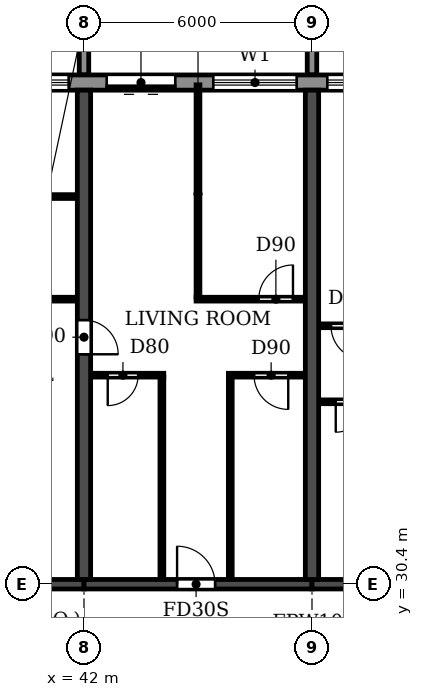
"""IFC4 building model, lengths in metres.
Left out: names, types, materials, properties, quantities, classifications, styles, units other than length and angle.
Written with IfcOpenShell. Run it as: python <this file> out.ifc"""

import sys

from ifc_helpers import new_model, si_unit, direction, frame, frame_2d, origin, place, context, subcontext, project, spatial, polyline, rectangle, outline, extrude, source, transform, mapped, element, fill, save


model = new_model("IFC4")
c1 = context("Model", 3, precision=1e-05, world=origin(), true_north=direction((0.0, 1.0)))
c2 = subcontext(c1, "Body", "Model", "MODEL_VIEW")
j1 = project(units=[si_unit("LENGTHUNIT", "METRE"), si_unit("PLANEANGLEUNIT", "RADIAN")], contexts=[c1])
p1 = place(None, origin())
s1 = spatial("IfcSite", under=j1, at=p1, CompositionType="ELEMENT")
p2 = place(p1, origin())
s2 = spatial("IfcBuilding", under=s1, at=p2, CompositionType="ELEMENT")
p3 = place(p2, frame((0.0, 0.0, 76.2)))
s3 = spatial("IfcBuildingStorey", under=s2, at=p3, CompositionType="ELEMENT", Elevation=76.2)
p4 = place(p3, frame((42.0, 30.525, 0.0), z_axis=(0.0, 0.0, 1.0), x_axis=(0.0, 1.0, 0.0)))
e1 = element("IfcWall", 1, at=p4, inside=s3, PredefinedType="SHEAR", context=c2, shape_type="SweptSolid", body=[
    extrude(rectangle(XDim=12.875, YDim=0.35, at=frame_2d((6.438, 0.0))), origin(), (0.0, 0.0, 1.0), 3.06),
])
p5 = place(p4, frame((5.925, 0.0, 0.0)))
e2 = element("IfcOpeningElement", 2, at=p5, cuts=e1, PredefinedType="OPENING", context=c2, shape_type="SweptSolid", body=[
    extrude(rectangle(XDim=0.9, YDim=2.1, at=frame_2d((0.45, 1.05))), frame((0.0, 0.185, 0.0), z_axis=(0.0, -1.0, 0.0), x_axis=(1.0, 0.0, 0.0)), (0.0, 0.0, 1.0), 0.37),
])
p6 = place(p3, frame((48.0, 30.525, 0.0), z_axis=(0.0, 0.0, 1.0), x_axis=(0.0, 1.0, 0.0)))
e3 = element("IfcWall", 3, at=p6, inside=s3, PredefinedType="SHEAR", context=c2, shape_type="SweptSolid", body=[
    extrude(rectangle(XDim=12.875, YDim=0.35, at=frame_2d((6.438, 0.0))), origin(), (0.0, 0.0, 1.0), 3.06),
])
p7 = place(p3, frame((36.0, 30.4, 0.0), z_axis=(0.0, 0.0, 1.0), x_axis=(1.0, 0.0, 0.0)))
e4 = element("IfcWall", 4, at=p7, inside=s3, PredefinedType="SHEAR", context=c2, shape_type="SweptSolid", body=[
    extrude(rectangle(XDim=6.0, YDim=0.25, at=frame_2d((3.0, 0.0))), origin(), (0.0, 0.0, 1.0), 2.46),
])
p8 = place(p3, frame((42.0, 30.4, 0.0), z_axis=(0.0, 0.0, 1.0), x_axis=(1.0, 0.0, 0.0)))
e5 = element("IfcWall", 5, at=p8, inside=s3, PredefinedType="SHEAR", context=c2, shape_type="SweptSolid", body=[
    extrude(rectangle(XDim=6.0, YDim=0.25, at=frame_2d((3.0, 0.0))), origin(), (0.0, 0.0, 1.0), 2.46),
])
p9 = place(p8, frame((2.45, 0.0, 0.0)))
e6 = element("IfcOpeningElement", 6, at=p9, cuts=e5, PredefinedType="OPENING", context=c2, shape_type="SweptSolid", body=[
    extrude(rectangle(XDim=1.0, YDim=2.1, at=frame_2d((0.5, 1.05))), frame((0.0, 0.135, 0.0), z_axis=(0.0, -1.0, 0.0), x_axis=(1.0, 0.0, 0.0)), (0.0, 0.0, 1.0), 0.27),
])
p10 = place(p3, frame((48.0, 30.4, 0.0), z_axis=(0.0, 0.0, 1.0), x_axis=(1.0, 0.0, 0.0)))
e7 = element("IfcWall", 7, at=p10, inside=s3, PredefinedType="SHEAR", context=c2, shape_type="SweptSolid", body=[
    extrude(rectangle(XDim=6.0, YDim=0.25, at=frame_2d((3.0, 0.0))), origin(), (0.0, 0.0, 1.0), 2.46),
])
p11 = place(p10, frame((2.45, 0.0, 0.0)))
e8 = element("IfcOpeningElement", 8, at=p11, cuts=e7, PredefinedType="OPENING", context=c2, shape_type="SweptSolid", body=[
    extrude(rectangle(XDim=1.0, YDim=2.1, at=frame_2d((0.5, 1.05))), frame((0.0, 0.135, 0.0), z_axis=(0.0, -1.0, 0.0), x_axis=(1.0, 0.0, 0.0)), (0.0, 0.0, 1.0), 0.27),
])
p12 = place(p3, frame((91.317, 43.6, 0.0), z_axis=(0.0, 0.0, 1.0), x_axis=(-1.0, 0.0, 0.0)))
e9 = element("IfcWall", 9, at=p12, inside=s3, PredefinedType="STANDARD", context=c2, shape_type="SweptSolid", body=[
    extrude(rectangle(XDim=80.634, YDim=0.4, at=frame_2d((40.317, 0.0))), origin(), (0.0, 0.0, 1.0), 3.06),
])
p13 = place(p12, frame((76.717, 0.0, 0.9)))
e10 = element("IfcOpeningElement", 10, at=p13, cuts=e9, PredefinedType="OPENING", context=c2, shape_type="SweptSolid", body=[
    extrude(rectangle(XDim=2.2, YDim=1.5, at=frame_2d((1.1, 0.75))), frame((0.0, 0.21, 0.0), z_axis=(0.0, -1.0, 0.0), x_axis=(1.0, 0.0, 0.0)), (0.0, 0.0, 1.0), 0.42),
])
p14 = place(p12, frame((73.917, 0.0, 0.0)))
e11 = element("IfcOpeningElement", 11, at=p14, cuts=e9, PredefinedType="OPENING", context=c2, shape_type="SweptSolid", body=[
    extrude(rectangle(XDim=1.8, YDim=2.4, at=frame_2d((0.9, 1.2))), frame((0.0, 0.21, 0.0), z_axis=(0.0, -1.0, 0.0), x_axis=(1.0, 0.0, 0.0)), (0.0, 0.0, 1.0), 0.42),
])
p15 = place(p12, frame((70.917, 0.0, 0.0)))
e12 = element("IfcOpeningElement", 12, at=p15, cuts=e9, PredefinedType="OPENING", context=c2, shape_type="SweptSolid", body=[
    extrude(rectangle(XDim=1.8, YDim=2.4, at=frame_2d((0.9, 1.2))), frame((0.0, 0.21, 0.0), z_axis=(0.0, -1.0, 0.0), x_axis=(1.0, 0.0, 0.0)), (0.0, 0.0, 1.0), 0.42),
])
p16 = place(p12, frame((67.717, 0.0, 0.9)))
e13 = element("IfcOpeningElement", 13, at=p16, cuts=e9, PredefinedType="OPENING", context=c2, shape_type="SweptSolid", body=[
    extrude(rectangle(XDim=2.2, YDim=1.5, at=frame_2d((1.1, 0.75))), frame((0.0, 0.21, 0.0), z_axis=(0.0, -1.0, 0.0), x_axis=(1.0, 0.0, 0.0)), (0.0, 0.0, 1.0), 0.42),
])
p17 = place(p12, frame((64.717, 0.0, 0.9)))
e14 = element("IfcOpeningElement", 14, at=p17, cuts=e9, PredefinedType="OPENING", context=c2, shape_type="SweptSolid", body=[
    extrude(rectangle(XDim=2.2, YDim=1.5, at=frame_2d((1.1, 0.75))), frame((0.0, 0.21, 0.0), z_axis=(0.0, -1.0, 0.0), x_axis=(1.0, 0.0, 0.0)), (0.0, 0.0, 1.0), 0.42),
])
p18 = place(p12, frame((61.917, 0.0, 0.0)))
e15 = element("IfcOpeningElement", 15, at=p18, cuts=e9, PredefinedType="OPENING", context=c2, shape_type="SweptSolid", body=[
    extrude(rectangle(XDim=1.8, YDim=2.4, at=frame_2d((0.9, 1.2))), frame((0.0, 0.21, 0.0), z_axis=(0.0, -1.0, 0.0), x_axis=(1.0, 0.0, 0.0)), (0.0, 0.0, 1.0), 0.42),
])
p19 = place(p12, frame((58.717, 0.0, 0.9)))
e16 = element("IfcOpeningElement", 16, at=p19, cuts=e9, PredefinedType="OPENING", context=c2, shape_type="SweptSolid", body=[
    extrude(rectangle(XDim=2.2, YDim=1.5, at=frame_2d((1.1, 0.75))), frame((0.0, 0.21, 0.0), z_axis=(0.0, -1.0, 0.0), x_axis=(1.0, 0.0, 0.0)), (0.0, 0.0, 1.0), 0.42),
])
p20 = place(p12, frame((55.917, 0.0, 0.0)))
e17 = element("IfcOpeningElement", 17, at=p20, cuts=e9, PredefinedType="OPENING", context=c2, shape_type="SweptSolid", body=[
    extrude(rectangle(XDim=1.8, YDim=2.4, at=frame_2d((0.9, 1.2))), frame((0.0, 0.21, 0.0), z_axis=(0.0, -1.0, 0.0), x_axis=(1.0, 0.0, 0.0)), (0.0, 0.0, 1.0), 0.42),
])
p21 = place(p12, frame((52.717, 0.0, 0.9)))
e18 = element("IfcOpeningElement", 18, at=p21, cuts=e9, PredefinedType="OPENING", context=c2, shape_type="SweptSolid", body=[
    extrude(rectangle(XDim=2.2, YDim=1.5, at=frame_2d((1.1, 0.75))), frame((0.0, 0.21, 0.0), z_axis=(0.0, -1.0, 0.0), x_axis=(1.0, 0.0, 0.0)), (0.0, 0.0, 1.0), 0.42),
])
p22 = place(p12, frame((49.717, 0.0, 0.9)))
e19 = element("IfcOpeningElement", 19, at=p22, cuts=e9, PredefinedType="OPENING", context=c2, shape_type="SweptSolid", body=[
    extrude(rectangle(XDim=2.2, YDim=1.5, at=frame_2d((1.1, 0.75))), frame((0.0, 0.21, 0.0), z_axis=(0.0, -1.0, 0.0), x_axis=(1.0, 0.0, 0.0)), (0.0, 0.0, 1.0), 0.42),
])
p23 = place(p12, frame((46.917, 0.0, 0.0)))
e20 = element("IfcOpeningElement", 20, at=p23, cuts=e9, PredefinedType="OPENING", context=c2, shape_type="SweptSolid", body=[
    extrude(rectangle(XDim=1.8, YDim=2.4, at=frame_2d((0.9, 1.2))), frame((0.0, 0.21, 0.0), z_axis=(0.0, -1.0, 0.0), x_axis=(1.0, 0.0, 0.0)), (0.0, 0.0, 1.0), 0.42),
])
p24 = place(p12, frame((43.717, 0.0, 0.9)))
e21 = element("IfcOpeningElement", 21, at=p24, cuts=e9, PredefinedType="OPENING", context=c2, shape_type="SweptSolid", body=[
    extrude(rectangle(XDim=2.2, YDim=1.5, at=frame_2d((1.1, 0.75))), frame((0.0, 0.21, 0.0), z_axis=(0.0, -1.0, 0.0), x_axis=(1.0, 0.0, 0.0)), (0.0, 0.0, 1.0), 0.42),
])
p25 = place(p12, frame((40.717, 0.0, 0.9)))
e22 = element("IfcOpeningElement", 22, at=p25, cuts=e9, PredefinedType="OPENING", context=c2, shape_type="SweptSolid", body=[
    extrude(rectangle(XDim=2.2, YDim=1.5, at=frame_2d((1.1, 0.75))), frame((0.0, 0.21, 0.0), z_axis=(0.0, -1.0, 0.0), x_axis=(1.0, 0.0, 0.0)), (0.0, 0.0, 1.0), 0.42),
])
p26 = place(p12, frame((37.917, 0.0, 0.0)))
e23 = element("IfcOpeningElement", 23, at=p26, cuts=e9, PredefinedType="OPENING", context=c2, shape_type="SweptSolid", body=[
    extrude(rectangle(XDim=1.8, YDim=2.4, at=frame_2d((0.9, 1.2))), frame((0.0, 0.21, 0.0), z_axis=(0.0, -1.0, 0.0), x_axis=(1.0, 0.0, 0.0)), (0.0, 0.0, 1.0), 0.42),
])
p27 = place(p12, frame((34.717, 0.0, 0.9)))
e24 = element("IfcOpeningElement", 24, at=p27, cuts=e9, PredefinedType="OPENING", context=c2, shape_type="SweptSolid", body=[
    extrude(rectangle(XDim=2.2, YDim=1.5, at=frame_2d((1.1, 0.75))), frame((0.0, 0.21, 0.0), z_axis=(0.0, -1.0, 0.0), x_axis=(1.0, 0.0, 0.0)), (0.0, 0.0, 1.0), 0.42),
])
p28 = place(p12, frame((31.917, 0.0, 0.0)))
e25 = element("IfcOpeningElement", 25, at=p28, cuts=e9, PredefinedType="OPENING", context=c2, shape_type="SweptSolid", body=[
    extrude(rectangle(XDim=1.8, YDim=2.4, at=frame_2d((0.9, 1.2))), frame((0.0, 0.21, 0.0), z_axis=(0.0, -1.0, 0.0), x_axis=(1.0, 0.0, 0.0)), (0.0, 0.0, 1.0), 0.42),
])
p29 = place(p12, frame((28.717, 0.0, 0.9)))
e26 = element("IfcOpeningElement", 26, at=p29, cuts=e9, PredefinedType="OPENING", context=c2, shape_type="SweptSolid", body=[
    extrude(rectangle(XDim=2.2, YDim=1.5, at=frame_2d((1.1, 0.75))), frame((0.0, 0.21, 0.0), z_axis=(0.0, -1.0, 0.0), x_axis=(1.0, 0.0, 0.0)), (0.0, 0.0, 1.0), 0.42),
])
p30 = place(p12, frame((25.717, 0.0, 0.9)))
e27 = element("IfcOpeningElement", 27, at=p30, cuts=e9, PredefinedType="OPENING", context=c2, shape_type="SweptSolid", body=[
    extrude(rectangle(XDim=2.2, YDim=1.5, at=frame_2d((1.1, 0.75))), frame((0.0, 0.21, 0.0), z_axis=(0.0, -1.0, 0.0), x_axis=(1.0, 0.0, 0.0)), (0.0, 0.0, 1.0), 0.42),
])
p31 = place(p12, frame((22.717, 0.0, 0.9)))
e28 = element("IfcOpeningElement", 28, at=p31, cuts=e9, PredefinedType="OPENING", context=c2, shape_type="SweptSolid", body=[
    extrude(rectangle(XDim=2.2, YDim=1.5, at=frame_2d((1.1, 0.75))), frame((0.0, 0.21, 0.0), z_axis=(0.0, -1.0, 0.0), x_axis=(1.0, 0.0, 0.0)), (0.0, 0.0, 1.0), 0.42),
])
p32 = place(p12, frame((19.917, 0.0, 0.0)))
e29 = element("IfcOpeningElement", 29, at=p32, cuts=e9, PredefinedType="OPENING", context=c2, shape_type="SweptSolid", body=[
    extrude(rectangle(XDim=1.8, YDim=2.4, at=frame_2d((0.9, 1.2))), frame((0.0, 0.21, 0.0), z_axis=(0.0, -1.0, 0.0), x_axis=(1.0, 0.0, 0.0)), (0.0, 0.0, 1.0), 0.42),
])
p33 = place(p12, frame((16.717, 0.0, 0.9)))
e30 = element("IfcOpeningElement", 30, at=p33, cuts=e9, PredefinedType="OPENING", context=c2, shape_type="SweptSolid", body=[
    extrude(rectangle(XDim=2.2, YDim=1.5, at=frame_2d((1.1, 0.75))), frame((0.0, 0.21, 0.0), z_axis=(0.0, -1.0, 0.0), x_axis=(1.0, 0.0, 0.0)), (0.0, 0.0, 1.0), 0.42),
])
p34 = place(p12, frame((13.717, 0.0, 0.9)))
e31 = element("IfcOpeningElement", 31, at=p34, cuts=e9, PredefinedType="OPENING", context=c2, shape_type="SweptSolid", body=[
    extrude(rectangle(XDim=2.2, YDim=1.5, at=frame_2d((1.1, 0.75))), frame((0.0, 0.21, 0.0), z_axis=(0.0, -1.0, 0.0), x_axis=(1.0, 0.0, 0.0)), (0.0, 0.0, 1.0), 0.42),
])
p35 = place(p12, frame((10.717, 0.0, 0.9)))
e32 = element("IfcOpeningElement", 32, at=p35, cuts=e9, PredefinedType="OPENING", context=c2, shape_type="SweptSolid", body=[
    extrude(rectangle(XDim=2.2, YDim=1.5, at=frame_2d((1.1, 0.75))), frame((0.0, 0.21, 0.0), z_axis=(0.0, -1.0, 0.0), x_axis=(1.0, 0.0, 0.0)), (0.0, 0.0, 1.0), 0.42),
])
p36 = place(p12, frame((7.917, 0.0, 0.0)))
e33 = element("IfcOpeningElement", 33, at=p36, cuts=e9, PredefinedType="OPENING", context=c2, shape_type="SweptSolid", body=[
    extrude(rectangle(XDim=1.8, YDim=2.4, at=frame_2d((0.9, 1.2))), frame((0.0, 0.21, 0.0), z_axis=(0.0, -1.0, 0.0), x_axis=(1.0, 0.0, 0.0)), (0.0, 0.0, 1.0), 0.42),
])
p37 = place(p12, frame((4.717, 0.0, 0.9)))
e34 = element("IfcOpeningElement", 34, at=p37, cuts=e9, PredefinedType="OPENING", context=c2, shape_type="SweptSolid", body=[
    extrude(rectangle(XDim=2.2, YDim=1.5, at=frame_2d((1.1, 0.75))), frame((0.0, 0.21, 0.0), z_axis=(0.0, -1.0, 0.0), x_axis=(1.0, 0.0, 0.0)), (0.0, 0.0, 1.0), 0.42),
])
p38 = place(p12, frame((1.917, 0.0, 0.0)))
e35 = element("IfcOpeningElement", 35, at=p38, cuts=e9, PredefinedType="OPENING", context=c2, shape_type="SweptSolid", body=[
    extrude(rectangle(XDim=1.8, YDim=2.4, at=frame_2d((0.9, 1.2))), frame((0.0, 0.21, 0.0), z_axis=(0.0, -1.0, 0.0), x_axis=(1.0, 0.0, 0.0)), (0.0, 0.0, 1.0), 0.42),
])
m1 = source(origin(), c2, "Body", "SweptSolid", [
    extrude(outline(polyline([(0.0, 0.0), (0.25, 0.0), (0.25, 3.1), (0.0, 3.1), (0.0, 0.0)])), origin(), (0.0, 0.0, 1.0), 3.1),
])
for number, where in (
    (36, (41.875, 43.8, 0.0)),
    (37, (47.875, 43.8, 0.0)),
):
    element("IfcWall", number, at=place(p3, frame(where)), inside=s3, PredefinedType="STANDARD", context=c2, shape_type="MappedRepresentation", body=[
        mapped(m1, transform((0.0, 0.0, 0.0))),
    ])
p39 = place(p3, frame((48.185, 35.2, 0.0), z_axis=(0.0, 0.0, 1.0), x_axis=(1.0, 0.0, 0.0)))
e38 = element("IfcWall", 38, at=p39, inside=s3, PredefinedType="PARTITIONING", context=c2, shape_type="SweptSolid", body=[
    extrude(rectangle(XDim=1.915, YDim=0.1, at=frame_2d((0.958, 0.0))), origin(), (0.0, 0.0, 1.0), 3.06),
])
p40 = place(p39, frame((0.44, 0.0, 0.0)))
e39 = element("IfcOpeningElement", 39, at=p40, cuts=e38, PredefinedType="OPENING", context=c2, shape_type="SweptSolid", body=[
    extrude(rectangle(XDim=0.8, YDim=2.1, at=frame_2d((0.4, 1.05))), frame((0.0, 0.06, 0.0), z_axis=(0.0, -1.0, 0.0), x_axis=(1.0, 0.0, 0.0)), (0.0, 0.0, 1.0), 0.12),
])
p41 = place(p3, frame((42.185, 35.9, 0.0), z_axis=(0.0, 0.0, 1.0), x_axis=(1.0, 0.0, 0.0)))
e40 = element("IfcWall", 40, at=p41, inside=s3, PredefinedType="PARTITIONING", context=c2, shape_type="SweptSolid", body=[
    extrude(rectangle(XDim=1.915, YDim=0.1, at=frame_2d((0.958, 0.0))), origin(), (0.0, 0.0, 1.0), 3.06),
])
p42 = place(p41, frame((0.44, 0.0, 0.0)))
e41 = element("IfcOpeningElement", 41, at=p42, cuts=e40, PredefinedType="OPENING", context=c2, shape_type="SweptSolid", body=[
    extrude(rectangle(XDim=0.8, YDim=2.1, at=frame_2d((0.4, 1.05))), frame((0.0, 0.06, 0.0), z_axis=(0.0, -1.0, 0.0), x_axis=(1.0, 0.0, 0.0)), (0.0, 0.0, 1.0), 0.12),
])
p43 = place(p3, frame((45.8, 35.9, 0.0), z_axis=(0.0, 0.0, 1.0), x_axis=(1.0, 0.0, 0.0)))
e42 = element("IfcWall", 42, at=p43, inside=s3, PredefinedType="PARTITIONING", context=c2, shape_type="SweptSolid", body=[
    extrude(rectangle(XDim=2.015, YDim=0.1, at=frame_2d((1.007, 0.0))), origin(), (0.0, 0.0, 1.0), 3.06),
])
p44 = place(p43, frame((0.675, 0.0, 0.0)))
e43 = element("IfcOpeningElement", 43, at=p44, cuts=e42, PredefinedType="OPENING", context=c2, shape_type="SweptSolid", body=[
    extrude(rectangle(XDim=0.9, YDim=2.1, at=frame_2d((0.45, 1.05))), frame((0.0, 0.06, 0.0), z_axis=(0.0, -1.0, 0.0), x_axis=(1.0, 0.0, 0.0)), (0.0, 0.0, 1.0), 0.12),
])
p45 = place(p3, frame((48.185, 37.2, 0.0), z_axis=(0.0, 0.0, 1.0), x_axis=(1.0, 0.0, 0.0)))
e44 = element("IfcWall", 44, at=p45, inside=s3, PredefinedType="PARTITIONING", context=c2, shape_type="SweptSolid", body=[
    extrude(rectangle(XDim=2.865, YDim=0.1, at=frame_2d((1.433, 0.0))), origin(), (0.0, 0.0, 1.0), 3.06),
])
p46 = place(p45, frame((0.315, 0.0, 0.0)))
e45 = element("IfcOpeningElement", 45, at=p46, cuts=e44, PredefinedType="OPENING", context=c2, shape_type="SweptSolid", body=[
    extrude(rectangle(XDim=0.9, YDim=2.1, at=frame_2d((0.45, 1.05))), frame((0.0, 0.06, 0.0), z_axis=(0.0, -1.0, 0.0), x_axis=(1.0, 0.0, 0.0)), (0.0, 0.0, 1.0), 0.12),
])
p47 = place(p3, frame((36.185, 37.9, 0.0), z_axis=(0.0, 0.0, 1.0), x_axis=(1.0, 0.0, 0.0)))
e46 = element("IfcWall", 46, at=p47, inside=s3, PredefinedType="PARTITIONING", context=c2, shape_type="SweptSolid", body=[
    extrude(rectangle(XDim=5.63, YDim=0.1, at=frame_2d((2.815, 0.0))), origin(), (0.0, 0.0, 1.0), 3.06),
])
p48 = place(p47, frame((1.965, 0.0, 0.0)))
e47 = element("IfcOpeningElement", 47, at=p48, cuts=e46, PredefinedType="OPENING", context=c2, shape_type="SweptSolid", body=[
    extrude(rectangle(XDim=0.9, YDim=2.1, at=frame_2d((0.45, 1.05))), frame((0.0, 0.06, 0.0), z_axis=(0.0, -1.0, 0.0), x_axis=(1.0, 0.0, 0.0)), (0.0, 0.0, 1.0), 0.12),
])
p49 = place(p3, frame((44.95, 37.9, 0.0), z_axis=(0.0, 0.0, 1.0), x_axis=(1.0, 0.0, 0.0)))
e48 = element("IfcWall", 48, at=p49, inside=s3, PredefinedType="PARTITIONING", context=c2, shape_type="SweptSolid", body=[
    extrude(rectangle(XDim=2.865, YDim=0.1, at=frame_2d((1.433, 0.0))), origin(), (0.0, 0.0, 1.0), 3.06),
])
p50 = place(p49, frame((1.65, 0.0, 0.0)))
e49 = element("IfcOpeningElement", 49, at=p50, cuts=e48, PredefinedType="OPENING", context=c2, shape_type="SweptSolid", body=[
    extrude(rectangle(XDim=0.9, YDim=2.1, at=frame_2d((0.45, 1.05))), frame((0.0, 0.06, 0.0), z_axis=(0.0, -1.0, 0.0), x_axis=(1.0, 0.0, 0.0)), (0.0, 0.0, 1.0), 0.12),
])
p51 = place(p3, frame((39.85, 40.6, 0.0), z_axis=(0.0, 0.0, 1.0), x_axis=(1.0, 0.0, 0.0)))
e50 = element("IfcWall", 50, at=p51, inside=s3, PredefinedType="PARTITIONING", context=c2, shape_type="SweptSolid", body=[
    extrude(rectangle(XDim=1.965, YDim=0.1, at=frame_2d((0.982, 0.0))), origin(), (0.0, 0.0, 1.0), 3.06),
])
p52 = place(p3, frame((44.05, 30.535, 0.0), z_axis=(0.0, 0.0, 1.0), x_axis=(0.0, 1.0, 0.0)))
e51 = element("IfcWall", 51, at=p52, inside=s3, PredefinedType="PARTITIONING", context=c2, shape_type="SweptSolid", body=[
    extrude(rectangle(XDim=5.315, YDim=0.1, at=frame_2d((2.658, 0.0))), origin(), (0.0, 0.0, 1.0), 3.06),
])
p53 = place(p3, frame((45.0, 37.95, 0.0), z_axis=(0.0, 0.0, 1.0), x_axis=(0.0, 1.0, 0.0)))
e52 = element("IfcWall", 52, at=p53, inside=s3, PredefinedType="PARTITIONING", context=c2, shape_type="SweptSolid", body=[
    extrude(rectangle(XDim=5.59, YDim=0.1, at=frame_2d((2.795, 0.0))), origin(), (0.0, 0.0, 1.0), 3.06),
])
p54 = place(p3, frame((45.85, 30.535, 0.0), z_axis=(0.0, 0.0, 1.0), x_axis=(0.0, 1.0, 0.0)))
e53 = element("IfcWall", 53, at=p54, inside=s3, PredefinedType="PARTITIONING", context=c2, shape_type="SweptSolid", body=[
    extrude(rectangle(XDim=5.315, YDim=0.1, at=frame_2d((2.658, 0.0))), origin(), (0.0, 0.0, 1.0), 3.06),
])
p55 = place(p22, origin())
e54 = element("IfcWindow", 54, at=p55, inside=s3, PartitioningType="DOUBLE_PANEL_HORIZONTAL", PredefinedType="WINDOW", context=c2, shape_type="SweptSolid", body=[
    extrude(rectangle(XDim=2.2, YDim=1.5, at=frame_2d((1.1, 0.75))), frame((0.0, 0.03, 0.0), z_axis=(0.0, -1.0, 0.0), x_axis=(1.0, 0.0, 0.0)), (0.0, 0.0, 1.0), 0.06),
])
fill(e19, e54)
p56 = place(p23, origin())
e55 = element("IfcDoor", 55, at=p56, inside=s3, OperationType="DOUBLE_DOOR_SLIDING", PredefinedType="DOOR", context=c2, shape_type="SweptSolid", body=[
    extrude(rectangle(XDim=1.8, YDim=2.4, at=frame_2d((0.9, 1.2))), frame((0.0, 0.025, 0.0), z_axis=(0.0, -1.0, 0.0), x_axis=(1.0, 0.0, 0.0)), (0.0, 0.0, 1.0), 0.05),
])
fill(e20, e55)
p57 = place(p24, origin())
e56 = element("IfcWindow", 56, at=p57, inside=s3, PartitioningType="DOUBLE_PANEL_HORIZONTAL", PredefinedType="WINDOW", context=c2, shape_type="SweptSolid", body=[
    extrude(rectangle(XDim=2.2, YDim=1.5, at=frame_2d((1.1, 0.75))), frame((0.0, 0.03, 0.0), z_axis=(0.0, -1.0, 0.0), x_axis=(1.0, 0.0, 0.0)), (0.0, 0.0, 1.0), 0.06),
])
fill(e21, e56)
p58 = place(p25, origin())
e57 = element("IfcWindow", 57, at=p58, inside=s3, PartitioningType="DOUBLE_PANEL_HORIZONTAL", PredefinedType="WINDOW", context=c2, shape_type="SweptSolid", body=[
    extrude(rectangle(XDim=2.2, YDim=1.5, at=frame_2d((1.1, 0.75))), frame((0.0, 0.03, 0.0), z_axis=(0.0, -1.0, 0.0), x_axis=(1.0, 0.0, 0.0)), (0.0, 0.0, 1.0), 0.06),
])
fill(e22, e57)
p59 = place(p5, frame((0.9, 0.0, 0.0), z_axis=(0.0, 0.0, 1.0), x_axis=(-1.0, 0.0, 0.0)))
e58 = element("IfcDoor", 58, at=p59, inside=s3, OperationType="SINGLE_SWING_RIGHT", PredefinedType="DOOR", context=c2, shape_type="SweptSolid", body=[
    extrude(rectangle(XDim=0.9, YDim=2.1, at=frame_2d((0.45, 1.05))), frame((0.0, 0.025, 0.0), z_axis=(0.0, -1.0, 0.0), x_axis=(1.0, 0.0, 0.0)), (0.0, 0.0, 1.0), 0.05),
])
fill(e2, e58)
p60 = place(p42, frame((0.8, 0.0, 0.0), z_axis=(0.0, 0.0, 1.0), x_axis=(-1.0, 0.0, 0.0)))
e59 = element("IfcDoor", 59, at=p60, inside=s3, OperationType="SINGLE_SWING_RIGHT", PredefinedType="DOOR", context=c2, shape_type="SweptSolid", body=[
    extrude(rectangle(XDim=0.8, YDim=2.1, at=frame_2d((0.4, 1.05))), frame((0.0, 0.025, 0.0), z_axis=(0.0, -1.0, 0.0), x_axis=(1.0, 0.0, 0.0)), (0.0, 0.0, 1.0), 0.05),
])
fill(e41, e59)
p61 = place(p9, origin())
e60 = element("IfcDoor", 60, at=p61, inside=s3, OperationType="SINGLE_SWING_LEFT", PredefinedType="DOOR", context=c2, shape_type="SweptSolid", body=[
    extrude(rectangle(XDim=1.0, YDim=2.1, at=frame_2d((0.5, 1.05))), frame((0.0, 0.025, 0.0), z_axis=(0.0, -1.0, 0.0), x_axis=(1.0, 0.0, 0.0)), (0.0, 0.0, 1.0), 0.05),
])
fill(e6, e60)
p62 = place(p44, frame((0.9, 0.0, 0.0), z_axis=(0.0, 0.0, 1.0), x_axis=(-1.0, 0.0, 0.0)))
e61 = element("IfcDoor", 61, at=p62, inside=s3, OperationType="SINGLE_SWING_LEFT", PredefinedType="DOOR", context=c2, shape_type="SweptSolid", body=[
    extrude(rectangle(XDim=0.9, YDim=2.1, at=frame_2d((0.45, 1.05))), frame((0.0, 0.025, 0.0), z_axis=(0.0, -1.0, 0.0), x_axis=(1.0, 0.0, 0.0)), (0.0, 0.0, 1.0), 0.05),
])
fill(e43, e61)
p63 = place(p50, origin())
e62 = element("IfcDoor", 62, at=p63, inside=s3, OperationType="SINGLE_SWING_RIGHT", PredefinedType="DOOR", context=c2, shape_type="SweptSolid", body=[
    extrude(rectangle(XDim=0.9, YDim=2.1, at=frame_2d((0.45, 1.05))), frame((0.0, 0.025, 0.0), z_axis=(0.0, -1.0, 0.0), x_axis=(1.0, 0.0, 0.0)), (0.0, 0.0, 1.0), 0.05),
])
fill(e49, e62)
p64 = place(p46, frame((0.9, 0.0, 0.0), z_axis=(0.0, 0.0, 1.0), x_axis=(-1.0, 0.0, 0.0)))
e63 = element("IfcDoor", 63, at=p64, inside=s3, OperationType="SINGLE_SWING_LEFT", PredefinedType="DOOR", context=c2, shape_type="SweptSolid", body=[
    extrude(rectangle(XDim=0.9, YDim=2.1, at=frame_2d((0.45, 1.05))), frame((0.0, 0.025, 0.0), z_axis=(0.0, -1.0, 0.0), x_axis=(1.0, 0.0, 0.0)), (0.0, 0.0, 1.0), 0.05),
])
fill(e45, e63)
p65 = place(p40, frame((0.8, 0.0, 0.0), z_axis=(0.0, 0.0, 1.0), x_axis=(-1.0, 0.0, 0.0)))
e64 = element("IfcDoor", 64, at=p65, inside=s3, OperationType="SINGLE_SWING_RIGHT", PredefinedType="DOOR", context=c2, shape_type="SweptSolid", body=[
    extrude(rectangle(XDim=0.8, YDim=2.1, at=frame_2d((0.4, 1.05))), frame((0.0, 0.025, 0.0), z_axis=(0.0, -1.0, 0.0), x_axis=(1.0, 0.0, 0.0)), (0.0, 0.0, 1.0), 0.05),
])
fill(e39, e64)
save(model, sys.argv[1])
